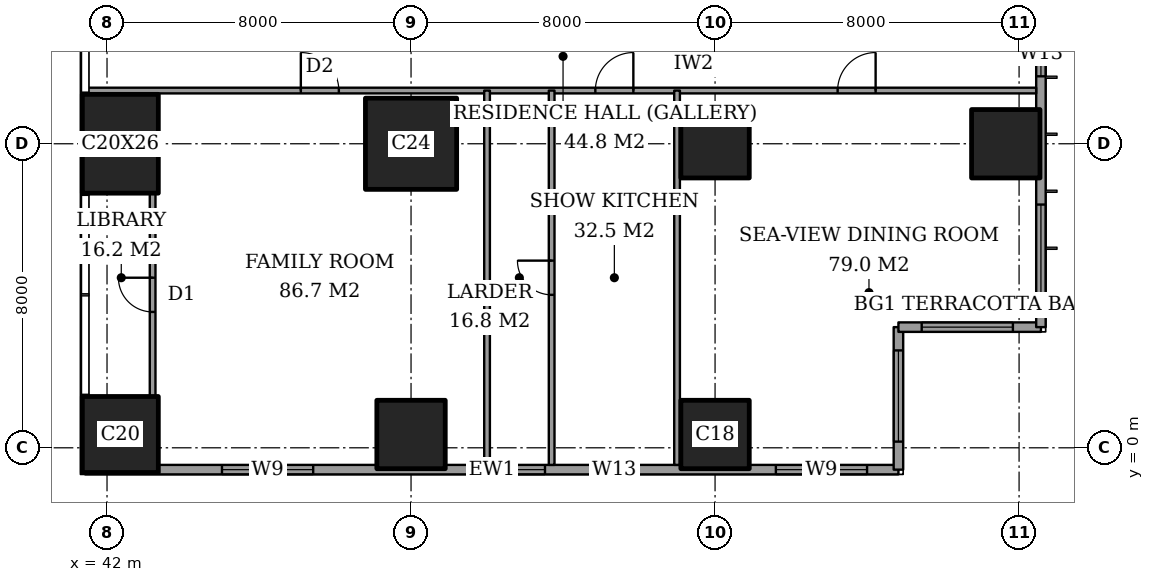
"""IFC4 building model, lengths in metres.
Left out: names, types, materials, properties, quantities, classifications, styles, units other than length and angle.
Written with IfcOpenShell. Run it as: python <this file> out.ifc"""

import sys

from ifc_helpers import new_model, si_unit, direction, frame, frame_2d, origin, origin_2d, place, context, subcontext, project, spatial, rectangle, extrude, element, fill, save


model = new_model("IFC4")
c1 = context("Model", 3, precision=1e-05, world=origin(), true_north=direction((0.0, 1.0)))
c2 = subcontext(c1, "Body", "Model", "MODEL_VIEW")
j1 = project(units=[si_unit("LENGTHUNIT", "METRE"), si_unit("PLANEANGLEUNIT", "RADIAN")], contexts=[c1])
p1 = place(None, origin())
s1 = spatial("IfcSite", under=j1, at=p1, CompositionType="ELEMENT")
p2 = place(p1, origin())
s2 = spatial("IfcBuilding", under=s1, at=p2, CompositionType="ELEMENT")
p3 = place(p2, frame((0.0, 0.0, 203.8)))
s3 = spatial("IfcBuildingStorey", under=s2, at=p3, CompositionType="ELEMENT", Elevation=203.8)
p4 = place(p3, frame((42.35, 0.35, 0.0), z_axis=(0.0, 0.0, 1.0), x_axis=(1.0, 0.0, 0.0)))
e1 = element("IfcColumn", 1, at=p4, inside=s3, PredefinedType="COLUMN", context=c2, shape_type="SweptSolid", body=[
    extrude(rectangle(XDim=2.0, YDim=2.0, at=origin_2d()), origin(), (0.0, 0.0, 1.0), 3.6),
])
p5 = place(p3, frame((42.35, 8.0, 0.0), z_axis=(0.0, 0.0, 1.0), x_axis=(1.0, 0.0, 0.0)))
e2 = element("IfcColumn", 2, at=p5, inside=s3, PredefinedType="COLUMN", context=c2, shape_type="SweptSolid", body=[
    extrude(rectangle(XDim=2.0, YDim=2.6, at=origin_2d()), origin(), (0.0, 0.0, 1.0), 3.6),
])
p6 = place(p3, frame((50.0, 0.35, 0.0), z_axis=(0.0, 0.0, 1.0), x_axis=(1.0, 0.0, 0.0)))
e3 = element("IfcColumn", 3, at=p6, inside=s3, PredefinedType="COLUMN", context=c2, shape_type="SweptSolid", body=[
    extrude(rectangle(XDim=1.8, YDim=1.8, at=origin_2d()), origin(), (0.0, 0.0, 1.0), 3.6),
])
p7 = place(p3, frame((50.0, 8.0, 0.0), z_axis=(0.0, 0.0, 1.0), x_axis=(1.0, 0.0, 0.0)))
e4 = element("IfcColumn", 4, at=p7, inside=s3, PredefinedType="COLUMN", context=c2, shape_type="SweptSolid", body=[
    extrude(rectangle(XDim=2.4, YDim=2.4, at=origin_2d()), origin(), (0.0, 0.0, 1.0), 3.6),
])
for number, where, z_axis, x_axis in (
    (5, (58.0, 0.35, 0.0), (0.0, 0.0, 1.0), (1.0, 0.0, 0.0)),
    (6, (58.0, 8.0, 0.0), (0.0, 0.0, 1.0), (1.0, 0.0, 0.0)),
    (7, (65.65, 8.0, 0.0), (0.0, 0.0, 1.0), (1.0, 0.0, 0.0)),
):
    element("IfcColumn", number, at=place(p3, frame(where, z_axis=z_axis, x_axis=x_axis)), inside=s3, PredefinedType="COLUMN", context=c2, shape_type="SweptSolid", body=[
        extrude(rectangle(XDim=1.8, YDim=1.8, at=origin_2d()), origin(), (0.0, 0.0, 1.0), 3.6),
    ])
p8 = place(p3, frame((41.425, -0.575, 0.0), z_axis=(0.0, 0.0, 1.0), x_axis=(1.0, 0.0, 0.0)))
e8 = element("IfcWall", 8, at=p8, inside=s3, PredefinedType="SOLIDWALL", context=c2, shape_type="SweptSolid", body=[
    extrude(rectangle(XDim=21.4, YDim=0.25, at=frame_2d((10.7, 0.0))), origin(), (0.0, 0.0, 1.0), 3.6),
])
p9 = place(p8, frame((3.6, 0.0, 0.2)))
e9 = element("IfcOpeningElement", 9, at=p9, cuts=e8, PredefinedType="OPENING", context=c2, shape_type="SweptSolid", body=[
    extrude(rectangle(XDim=2.4, YDim=2.4, at=frame_2d((1.2, 1.2))), frame((0.0, 0.135, 0.0), z_axis=(0.0, -1.0, 0.0), x_axis=(1.0, 0.0, 0.0)), (0.0, 0.0, 1.0), 0.27),
])
p10 = place(p8, frame((10.9, 0.0, 0.2)))
e10 = element("IfcOpeningElement", 10, at=p10, cuts=e8, PredefinedType="OPENING", context=c2, shape_type="SweptSolid", body=[
    extrude(rectangle(XDim=1.2, YDim=2.4, at=frame_2d((0.6, 1.2))), frame((0.0, 0.135, 0.0), z_axis=(0.0, -1.0, 0.0), x_axis=(1.0, 0.0, 0.0)), (0.0, 0.0, 1.0), 0.27),
])
p11 = place(p8, frame((13.325, 0.0, 0.2)))
e11 = element("IfcOpeningElement", 11, at=p11, cuts=e8, PredefinedType="OPENING", context=c2, shape_type="SweptSolid", body=[
    extrude(rectangle(XDim=1.2, YDim=2.4, at=frame_2d((0.6, 1.2))), frame((0.0, 0.135, 0.0), z_axis=(0.0, -1.0, 0.0), x_axis=(1.0, 0.0, 0.0)), (0.0, 0.0, 1.0), 0.27),
])
p12 = place(p8, frame((18.175, 0.0, 0.2)))
e12 = element("IfcOpeningElement", 12, at=p12, cuts=e8, PredefinedType="OPENING", context=c2, shape_type="SweptSolid", body=[
    extrude(rectangle(XDim=2.4, YDim=2.4, at=frame_2d((1.2, 1.2))), frame((0.0, 0.135, 0.0), z_axis=(0.0, -1.0, 0.0), x_axis=(1.0, 0.0, 0.0)), (0.0, 0.0, 1.0), 0.27),
])
p13 = place(p3, frame((62.825, -0.575, 0.0), z_axis=(0.0, 0.0, 1.0), x_axis=(0.0, 1.0, 0.0)))
e13 = element("IfcWall", 13, at=p13, inside=s3, PredefinedType="SOLIDWALL", context=c2, shape_type="SweptSolid", body=[
    extrude(rectangle(XDim=3.75, YDim=0.25, at=frame_2d((1.875, 0.0))), origin(), (0.0, 0.0, 1.0), 3.6),
])
p14 = place(p13, frame((0.738, 0.0, 0.2)))
e14 = element("IfcOpeningElement", 14, at=p14, cuts=e13, PredefinedType="OPENING", context=c2, shape_type="SweptSolid", body=[
    extrude(rectangle(XDim=2.4, YDim=2.4, at=frame_2d((1.2, 1.2))), frame((0.0, 0.135, 0.0), z_axis=(0.0, -1.0, 0.0), x_axis=(1.0, 0.0, 0.0)), (0.0, 0.0, 1.0), 0.27),
])
p15 = place(p3, frame((62.825, 3.175, 0.0), z_axis=(0.0, 0.0, 1.0), x_axis=(1.0, 0.0, 0.0)))
e15 = element("IfcWall", 15, at=p15, inside=s3, PredefinedType="SOLIDWALL", context=c2, shape_type="SweptSolid", body=[
    extrude(rectangle(XDim=3.75, YDim=0.25, at=frame_2d((1.875, 0.0))), origin(), (0.0, 0.0, 1.0), 3.6),
])
p16 = place(p15, frame((0.613, 0.0, 0.2)))
e16 = element("IfcOpeningElement", 16, at=p16, cuts=e15, PredefinedType="OPENING", context=c2, shape_type="SweptSolid", body=[
    extrude(rectangle(XDim=2.4, YDim=2.4, at=frame_2d((1.2, 1.2))), frame((0.0, 0.135, 0.0), z_axis=(0.0, -1.0, 0.0), x_axis=(1.0, 0.0, 0.0)), (0.0, 0.0, 1.0), 0.27),
])
p17 = place(p3, frame((66.575, 3.175, 0.0), z_axis=(0.0, 0.0, 1.0), x_axis=(0.0, 1.0, 0.0)))
e17 = element("IfcWall", 17, at=p17, inside=s3, PredefinedType="SOLIDWALL", context=c2, shape_type="SweptSolid", body=[
    extrude(rectangle(XDim=41.65, YDim=0.25, at=frame_2d((20.825, 0.0))), origin(), (0.0, 0.0, 1.0), 3.6),
])
p18 = place(p17, frame((0.825, 0.0, 0.2)))
e18 = element("IfcOpeningElement", 18, at=p18, cuts=e17, PredefinedType="OPENING", context=c2, shape_type="SweptSolid", body=[
    extrude(rectangle(XDim=2.4, YDim=2.4, at=frame_2d((1.2, 1.2))), frame((0.0, 0.135, 0.0), z_axis=(0.0, -1.0, 0.0), x_axis=(1.0, 0.0, 0.0)), (0.0, 0.0, 1.0), 0.27),
])
p19 = place(p17, frame((6.6, 0.0, 0.2)))
e19 = element("IfcOpeningElement", 19, at=p19, cuts=e17, PredefinedType="OPENING", context=c2, shape_type="SweptSolid", body=[
    extrude(rectangle(XDim=1.2, YDim=2.4, at=frame_2d((0.6, 1.2))), frame((0.0, 0.135, 0.0), z_axis=(0.0, -1.0, 0.0), x_axis=(1.0, 0.0, 0.0)), (0.0, 0.0, 1.0), 0.27),
])
p20 = place(p17, frame((8.775, 0.0, 0.2)))
e20 = element("IfcOpeningElement", 20, at=p20, cuts=e17, PredefinedType="OPENING", context=c2, shape_type="SweptSolid", body=[
    extrude(rectangle(XDim=2.4, YDim=2.4, at=frame_2d((1.2, 1.2))), frame((0.0, 0.135, 0.0), z_axis=(0.0, -1.0, 0.0), x_axis=(1.0, 0.0, 0.0)), (0.0, 0.0, 1.0), 0.27),
])
p21 = place(p17, frame((15.675, 0.0, 0.2)))
e21 = element("IfcOpeningElement", 21, at=p21, cuts=e17, PredefinedType="OPENING", context=c2, shape_type="SweptSolid", body=[
    extrude(rectangle(XDim=2.4, YDim=2.4, at=frame_2d((1.2, 1.2))), frame((0.0, 0.135, 0.0), z_axis=(0.0, -1.0, 0.0), x_axis=(1.0, 0.0, 0.0)), (0.0, 0.0, 1.0), 0.27),
])
p22 = place(p17, frame((23.575, 0.0, 0.2)))
e22 = element("IfcOpeningElement", 22, at=p22, cuts=e17, PredefinedType="OPENING", context=c2, shape_type="SweptSolid", body=[
    extrude(rectangle(XDim=2.4, YDim=2.4, at=frame_2d((1.2, 1.2))), frame((0.0, 0.135, 0.0), z_axis=(0.0, -1.0, 0.0), x_axis=(1.0, 0.0, 0.0)), (0.0, 0.0, 1.0), 0.27),
])
p23 = place(p17, frame((30.675, 0.0, 0.2)))
e23 = element("IfcOpeningElement", 23, at=p23, cuts=e17, PredefinedType="OPENING", context=c2, shape_type="SweptSolid", body=[
    extrude(rectangle(XDim=2.4, YDim=2.4, at=frame_2d((1.2, 1.2))), frame((0.0, 0.135, 0.0), z_axis=(0.0, -1.0, 0.0), x_axis=(1.0, 0.0, 0.0)), (0.0, 0.0, 1.0), 0.27),
])
p24 = place(p17, frame((34.325, 0.0, 0.2)))
e24 = element("IfcOpeningElement", 24, at=p24, cuts=e17, PredefinedType="OPENING", context=c2, shape_type="SweptSolid", body=[
    extrude(rectangle(XDim=1.2, YDim=2.4, at=frame_2d((0.6, 1.2))), frame((0.0, 0.135, 0.0), z_axis=(0.0, -1.0, 0.0), x_axis=(1.0, 0.0, 0.0)), (0.0, 0.0, 1.0), 0.27),
])
p25 = place(p17, frame((38.425, 0.0, 0.2)))
e25 = element("IfcOpeningElement", 25, at=p25, cuts=e17, PredefinedType="OPENING", context=c2, shape_type="SweptSolid", body=[
    extrude(rectangle(XDim=2.4, YDim=2.4, at=frame_2d((1.2, 1.2))), frame((0.0, 0.135, 0.0), z_axis=(0.0, -1.0, 0.0), x_axis=(1.0, 0.0, 0.0)), (0.0, 0.0, 1.0), 0.27),
])
p26 = place(p3, frame((41.439, 9.4, 0.0), z_axis=(0.0, 0.0, 1.0), x_axis=(1.0, 0.0, 0.0)))
e26 = element("IfcWall", 26, at=p26, inside=s3, PredefinedType="PARTITIONING", context=c2, shape_type="SweptSolid", body=[
    extrude(rectangle(XDim=25.011, YDim=0.15, at=frame_2d((12.505, 0.0))), origin(), (0.0, 0.0, 1.0), 3.35),
])
p27 = place(p26, frame((19.786, 0.0, 0.0)))
e27 = element("IfcOpeningElement", 27, at=p27, cuts=e26, PredefinedType="OPENING", context=c2, shape_type="SweptSolid", body=[
    extrude(rectangle(XDim=1.0, YDim=2.1, at=frame_2d((0.5, 1.05))), frame((0.0, 0.085, 0.0), z_axis=(0.0, -1.0, 0.0), x_axis=(1.0, 0.0, 0.0)), (0.0, 0.0, 1.0), 0.17),
])
p28 = place(p26, frame((13.411, 0.0, 0.0)))
e28 = element("IfcOpeningElement", 28, at=p28, cuts=e26, PredefinedType="OPENING", context=c2, shape_type="SweptSolid", body=[
    extrude(rectangle(XDim=1.0, YDim=2.1, at=frame_2d((0.5, 1.05))), frame((0.0, 0.085, 0.0), z_axis=(0.0, -1.0, 0.0), x_axis=(1.0, 0.0, 0.0)), (0.0, 0.0, 1.0), 0.17),
])
p29 = place(p26, frame((5.661, 0.0, 0.0)))
e29 = element("IfcOpeningElement", 29, at=p29, cuts=e26, PredefinedType="OPENING", context=c2, shape_type="SweptSolid", body=[
    extrude(rectangle(XDim=1.0, YDim=2.1, at=frame_2d((0.5, 1.05))), frame((0.0, 0.085, 0.0), z_axis=(0.0, -1.0, 0.0), x_axis=(1.0, 0.0, 0.0)), (0.0, 0.0, 1.0), 0.17),
])
p30 = place(p3, frame((43.2, 1.35, 0.0), z_axis=(0.0, 0.0, 1.0), x_axis=(0.0, 1.0, 0.0)))
e30 = element("IfcWall", 30, at=p30, inside=s3, PredefinedType="PARTITIONING", context=c2, shape_type="SweptSolid", body=[
    extrude(rectangle(XDim=5.35, YDim=0.15, at=frame_2d((2.675, 0.0))), origin(), (0.0, 0.0, 1.0), 3.35),
])
p31 = place(p30, frame((2.225, 0.0, 0.0)))
e31 = element("IfcOpeningElement", 31, at=p31, cuts=e30, PredefinedType="OPENING", context=c2, shape_type="SweptSolid", body=[
    extrude(rectangle(XDim=0.9, YDim=2.1, at=frame_2d((0.45, 1.05))), frame((0.0, 0.085, 0.0), z_axis=(0.0, -1.0, 0.0), x_axis=(1.0, 0.0, 0.0)), (0.0, 0.0, 1.0), 0.17),
])
p32 = place(p3, frame((52.0, -0.45, 0.0), z_axis=(0.0, 0.0, 1.0), x_axis=(0.0, 1.0, 0.0)))
e32 = element("IfcWall", 32, at=p32, inside=s3, PredefinedType="PARTITIONING", context=c2, shape_type="SweptSolid", body=[
    extrude(rectangle(XDim=9.85, YDim=0.15, at=frame_2d((4.925, 0.0))), origin(), (0.0, 0.0, 1.0), 3.35),
])
p33 = place(p3, frame((53.7, -0.45, 0.0), z_axis=(0.0, 0.0, 1.0), x_axis=(0.0, 1.0, 0.0)))
e33 = element("IfcWall", 33, at=p33, inside=s3, PredefinedType="PARTITIONING", context=c2, shape_type="SweptSolid", body=[
    extrude(rectangle(XDim=9.85, YDim=0.15, at=frame_2d((4.925, 0.0))), origin(), (0.0, 0.0, 1.0), 3.35),
])
p34 = place(p33, frame((4.475, 0.0, 0.0)))
e34 = element("IfcOpeningElement", 34, at=p34, cuts=e33, PredefinedType="OPENING", context=c2, shape_type="SweptSolid", body=[
    extrude(rectangle(XDim=0.9, YDim=2.1, at=frame_2d((0.45, 1.05))), frame((0.0, 0.085, 0.0), z_axis=(0.0, -1.0, 0.0), x_axis=(1.0, 0.0, 0.0)), (0.0, 0.0, 1.0), 0.17),
])
p35 = place(p3, frame((57.0, -0.45, 0.0), z_axis=(0.0, 0.0, 1.0), x_axis=(0.0, 1.0, 0.0)))
e35 = element("IfcWall", 35, at=p35, inside=s3, PredefinedType="PARTITIONING", context=c2, shape_type="SweptSolid", body=[
    extrude(rectangle(XDim=9.85, YDim=0.15, at=frame_2d((4.925, 0.0))), origin(), (0.0, 0.0, 1.0), 3.35),
])
p36 = place(p9, origin())
e36 = element("IfcWindow", 36, at=p36, inside=s3, PartitioningType="SINGLE_PANEL", PredefinedType="WINDOW", context=c2, shape_type="SweptSolid", body=[
    extrude(rectangle(XDim=2.4, YDim=2.4, at=frame_2d((1.2, 1.2))), frame((0.0, 0.03, 0.0), z_axis=(0.0, -1.0, 0.0), x_axis=(1.0, 0.0, 0.0)), (0.0, 0.0, 1.0), 0.06),
])
fill(e9, e36)
p37 = place(p10, origin())
e37 = element("IfcWindow", 37, at=p37, inside=s3, PartitioningType="SINGLE_PANEL", PredefinedType="WINDOW", context=c2, shape_type="SweptSolid", body=[
    extrude(rectangle(XDim=1.2, YDim=2.4, at=frame_2d((0.6, 1.2))), frame((0.0, 0.03, 0.0), z_axis=(0.0, -1.0, 0.0), x_axis=(1.0, 0.0, 0.0)), (0.0, 0.0, 1.0), 0.06),
])
fill(e10, e37)
p38 = place(p11, origin())
e38 = element("IfcWindow", 38, at=p38, inside=s3, PartitioningType="SINGLE_PANEL", PredefinedType="WINDOW", context=c2, shape_type="SweptSolid", body=[
    extrude(rectangle(XDim=1.2, YDim=2.4, at=frame_2d((0.6, 1.2))), frame((0.0, 0.03, 0.0), z_axis=(0.0, -1.0, 0.0), x_axis=(1.0, 0.0, 0.0)), (0.0, 0.0, 1.0), 0.06),
])
fill(e11, e38)
p39 = place(p12, origin())
e39 = element("IfcWindow", 39, at=p39, inside=s3, PartitioningType="SINGLE_PANEL", PredefinedType="WINDOW", context=c2, shape_type="SweptSolid", body=[
    extrude(rectangle(XDim=2.4, YDim=2.4, at=frame_2d((1.2, 1.2))), frame((0.0, 0.03, 0.0), z_axis=(0.0, -1.0, 0.0), x_axis=(1.0, 0.0, 0.0)), (0.0, 0.0, 1.0), 0.06),
])
fill(e12, e39)
p40 = place(p14, origin())
e40 = element("IfcWindow", 40, at=p40, inside=s3, PartitioningType="SINGLE_PANEL", PredefinedType="WINDOW", context=c2, shape_type="SweptSolid", body=[
    extrude(rectangle(XDim=2.4, YDim=2.4, at=frame_2d((1.2, 1.2))), frame((0.0, 0.03, 0.0), z_axis=(0.0, -1.0, 0.0), x_axis=(1.0, 0.0, 0.0)), (0.0, 0.0, 1.0), 0.06),
])
fill(e14, e40)
p41 = place(p16, origin())
e41 = element("IfcWindow", 41, at=p41, inside=s3, PartitioningType="SINGLE_PANEL", PredefinedType="WINDOW", context=c2, shape_type="SweptSolid", body=[
    extrude(rectangle(XDim=2.4, YDim=2.4, at=frame_2d((1.2, 1.2))), frame((0.0, 0.03, 0.0), z_axis=(0.0, -1.0, 0.0), x_axis=(1.0, 0.0, 0.0)), (0.0, 0.0, 1.0), 0.06),
])
fill(e16, e41)
p42 = place(p18, origin())
e42 = element("IfcWindow", 42, at=p42, inside=s3, PartitioningType="SINGLE_PANEL", PredefinedType="WINDOW", context=c2, shape_type="SweptSolid", body=[
    extrude(rectangle(XDim=2.4, YDim=2.4, at=frame_2d((1.2, 1.2))), frame((0.0, 0.03, 0.0), z_axis=(0.0, -1.0, 0.0), x_axis=(1.0, 0.0, 0.0)), (0.0, 0.0, 1.0), 0.06),
])
fill(e18, e42)
p43 = place(p19, origin())
e43 = element("IfcWindow", 43, at=p43, inside=s3, PartitioningType="SINGLE_PANEL", PredefinedType="WINDOW", context=c2, shape_type="SweptSolid", body=[
    extrude(rectangle(XDim=1.2, YDim=2.4, at=frame_2d((0.6, 1.2))), frame((0.0, 0.03, 0.0), z_axis=(0.0, -1.0, 0.0), x_axis=(1.0, 0.0, 0.0)), (0.0, 0.0, 1.0), 0.06),
])
fill(e19, e43)
p44 = place(p27, origin())
e44 = element("IfcDoor", 44, at=p44, inside=s3, OperationType="SINGLE_SWING_LEFT", PredefinedType="DOOR", context=c2, shape_type="SweptSolid", body=[
    extrude(rectangle(XDim=1.0, YDim=2.1, at=frame_2d((0.5, 1.05))), frame((0.0, 0.025, 0.0), z_axis=(0.0, -1.0, 0.0), x_axis=(1.0, 0.0, 0.0)), (0.0, 0.0, 1.0), 0.05),
])
fill(e27, e44)
p45 = place(p28, origin())
e45 = element("IfcDoor", 45, at=p45, inside=s3, OperationType="SINGLE_SWING_LEFT", PredefinedType="DOOR", context=c2, shape_type="SweptSolid", body=[
    extrude(rectangle(XDim=1.0, YDim=2.1, at=frame_2d((0.5, 1.05))), frame((0.0, 0.025, 0.0), z_axis=(0.0, -1.0, 0.0), x_axis=(1.0, 0.0, 0.0)), (0.0, 0.0, 1.0), 0.05),
])
fill(e28, e45)
p46 = place(p34, origin())
e46 = element("IfcDoor", 46, at=p46, inside=s3, OperationType="SINGLE_SWING_LEFT", PredefinedType="DOOR", context=c2, shape_type="SweptSolid", body=[
    extrude(rectangle(XDim=0.9, YDim=2.1, at=frame_2d((0.45, 1.05))), frame((0.0, 0.025, 0.0), z_axis=(0.0, -1.0, 0.0), x_axis=(1.0, 0.0, 0.0)), (0.0, 0.0, 1.0), 0.05),
])
fill(e34, e46)
p47 = place(p29, origin())
e47 = element("IfcDoor", 47, at=p47, inside=s3, OperationType="SINGLE_SWING_RIGHT", PredefinedType="DOOR", context=c2, shape_type="SweptSolid", body=[
    extrude(rectangle(XDim=1.0, YDim=2.1, at=frame_2d((0.5, 1.05))), frame((0.0, 0.025, 0.0), z_axis=(0.0, -1.0, 0.0), x_axis=(1.0, 0.0, 0.0)), (0.0, 0.0, 1.0), 0.05),
])
fill(e29, e47)
p48 = place(p31, origin())
e48 = element("IfcDoor", 48, at=p48, inside=s3, OperationType="SINGLE_SWING_LEFT", PredefinedType="DOOR", context=c2, shape_type="SweptSolid", body=[
    extrude(rectangle(XDim=0.9, YDim=2.1, at=frame_2d((0.45, 1.05))), frame((0.0, 0.025, 0.0), z_axis=(0.0, -1.0, 0.0), x_axis=(1.0, 0.0, 0.0)), (0.0, 0.0, 1.0), 0.05),
])
fill(e31, e48)
save(model, sys.argv[1])
